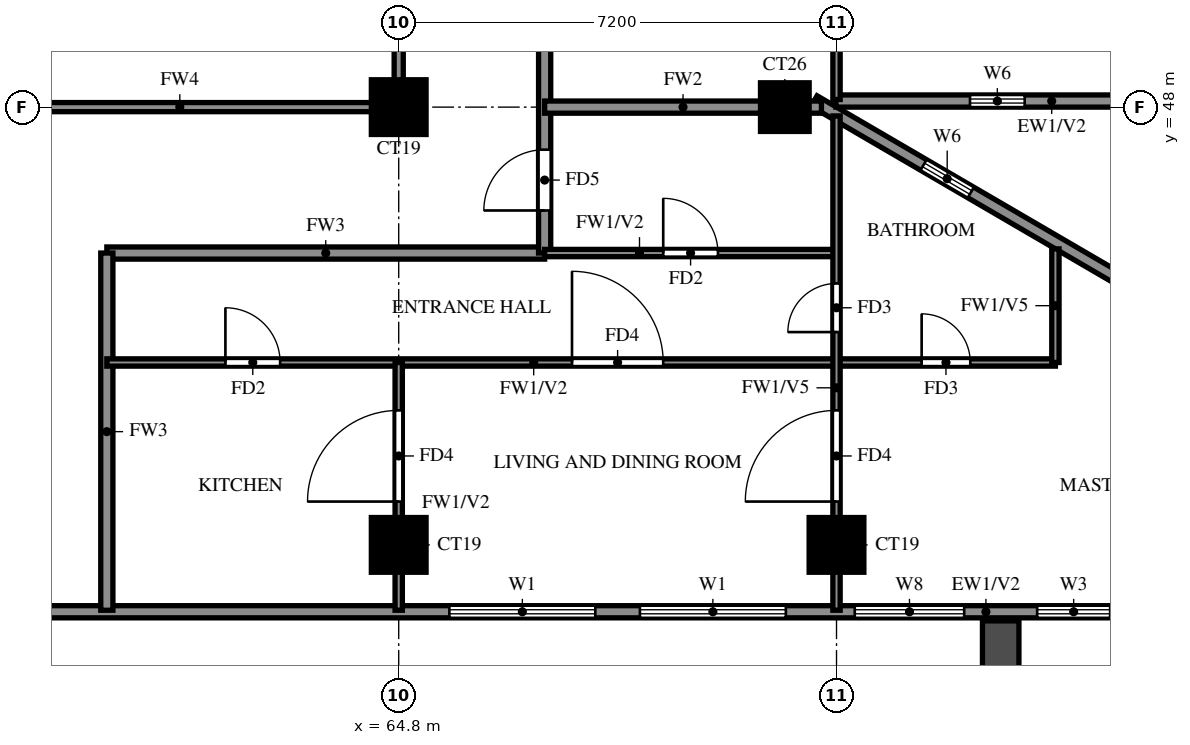
"""IFC4 building model, lengths in metres.
Left out: names, types, materials, properties, quantities, classifications, styles, units other than length and angle.
Written with IfcOpenShell. Run it as: python <this file> out.ifc"""

import sys

from ifc_helpers import new_model, si_unit, direction, frame, frame_2d, origin, origin_2d, place, context, subcontext, project, spatial, rectangle, extrude, source, transform, mapped, element, fill, save


model = new_model("IFC4")
c1 = context("Model", 3, precision=1e-05, world=origin(), true_north=direction((0.0, 1.0)))
c2 = subcontext(c1, "Body", "Model", "MODEL_VIEW")
j1 = project(units=[si_unit("LENGTHUNIT", "METRE"), si_unit("PLANEANGLEUNIT", "RADIAN")], contexts=[c1])
p1 = place(None, origin())
s1 = spatial("IfcSite", under=j1, at=p1, CompositionType="ELEMENT")
p2 = place(p1, origin())
s2 = spatial("IfcBuilding", under=s1, at=p2, CompositionType="ELEMENT")
p3 = place(p2, frame((0.0, 0.0, 195.5)))
s3 = spatial("IfcBuildingStorey", under=s2, at=p3, CompositionType="ELEMENT", Elevation=195.5)
m1 = source(origin(), c2, "Body", "SweptSolid", [
    extrude(rectangle(XDim=0.9, YDim=0.9, at=origin_2d()), origin(), (0.0, 0.0, 1.0), 3.2),
])
for number, where, z_axis, x_axis in (
    (1, (64.8, 40.8, 0.0), (0.0, 0.0, 1.0), (1.0, 0.0, 0.0)),
    (2, (72.0, 40.8, 0.0), (0.0, 0.0, 1.0), (1.0, 0.0, 0.0)),
    (3, (64.8, 48.0, 0.0), (0.0, 0.0, 1.0), (1.0, 0.0, 0.0)),
):
    element("IfcColumn", number, at=place(p3, frame(where, z_axis=z_axis, x_axis=x_axis)), inside=s3, PredefinedType="COLUMN", context=c2, shape_type="MappedRepresentation", body=[
        mapped(m1, transform((0.0, 0.0, 0.0))),
    ])
m2 = source(origin(), c2, "Body", "SweptSolid", [
    extrude(rectangle(XDim=0.8, YDim=0.8, at=origin_2d()), origin(), (0.0, 0.0, 1.0), 3.2),
])
p4 = place(p3, frame((71.15, 48.0, 0.0), z_axis=(0.0, 0.0, 1.0), x_axis=(1.0, 0.0, 0.0)))
e4 = element("IfcColumn", 4, at=p4, inside=s3, PredefinedType="COLUMN", context=c2, shape_type="MappedRepresentation", body=[
    mapped(m2, transform((0.0, 0.0, 0.0))),
])
p5 = place(p3, frame((85.719, 39.881, 0.0), z_axis=(0.0, 0.0, 1.0), x_axis=(-0.86377618652, 0.503875678716, 0.0)))
e5 = element("IfcWall", 5, at=p5, inside=s3, PredefinedType="SOLIDWALL", context=c2, shape_type="SweptSolid", body=[
    extrude(rectangle(XDim=16.311, YDim=0.2, at=frame_2d((8.156, 0.0))), origin(), (0.0, 0.0, 1.0), 3.2),
])
p6 = place(p5, frame((13.326, 0.0, 1.5)))
e6 = element("IfcOpeningElement", 6, at=p6, cuts=e5, PredefinedType="OPENING", context=c2, shape_type="SweptSolid", body=[
    extrude(rectangle(XDim=0.9, YDim=0.9, at=frame_2d((0.45, 0.45))), frame((0.0, 0.11, 0.0), z_axis=(0.0, -1.0, 0.0), x_axis=(1.0, 0.0, 0.0)), (0.0, 0.0, 1.0), 0.22),
])
p7 = place(p3, frame((71.99, 48.1, 0.0), z_axis=(0.0, 0.0, 1.0), x_axis=(1.0, 0.0, 0.0)))
e7 = element("IfcWall", 7, at=p7, inside=s3, PredefinedType="SOLIDWALL", context=c2, shape_type="SweptSolid", body=[
    extrude(rectangle(XDim=6.76, YDim=0.2, at=frame_2d((3.38, 0.0))), origin(), (0.0, 0.0, 1.0), 3.2),
])
p8 = place(p7, frame((2.205, 0.0, 1.5)))
e8 = element("IfcOpeningElement", 8, at=p8, cuts=e7, PredefinedType="OPENING", context=c2, shape_type="SweptSolid", body=[
    extrude(rectangle(XDim=0.9, YDim=0.9, at=frame_2d((0.45, 0.45))), frame((0.0, 0.11, 0.0), z_axis=(0.0, -1.0, 0.0), x_axis=(1.0, 0.0, 0.0)), (0.0, 0.0, 1.0), 0.22),
])
p9 = place(p3, frame((58.8, 39.7, 0.0), z_axis=(0.0, 0.0, 1.0), x_axis=(1.0, 0.0, 0.0)))
e9 = element("IfcWall", 9, at=p9, inside=s3, PredefinedType="SOLIDWALL", context=c2, shape_type="SweptSolid", body=[
    extrude(rectangle(XDim=27.23, YDim=0.2, at=frame_2d((13.615, 0.0))), origin(), (0.0, 0.0, 1.0), 3.2),
])
p10 = place(p9, frame((18.3, 0.0, 0.0)))
e10 = element("IfcOpeningElement", 10, at=p10, cuts=e9, PredefinedType="OPENING", context=c2, shape_type="SweptSolid", body=[
    extrude(rectangle(XDim=1.8, YDim=2.4, at=frame_2d((0.9, 1.2))), frame((0.0, 0.11, 0.0), z_axis=(0.0, -1.0, 0.0), x_axis=(1.0, 0.0, 0.0)), (0.0, 0.0, 1.0), 0.22),
])
p11 = place(p9, frame((6.833, 0.0, 0.6)))
e11 = element("IfcOpeningElement", 11, at=p11, cuts=e9, PredefinedType="OPENING", context=c2, shape_type="SweptSolid", body=[
    extrude(rectangle(XDim=2.4, YDim=2.4, at=frame_2d((1.2, 1.2))), frame((0.0, 0.11, 0.0), z_axis=(0.0, -1.0, 0.0), x_axis=(1.0, 0.0, 0.0)), (0.0, 0.0, 1.0), 0.22),
])
p12 = place(p9, frame((9.967, 0.0, 0.6)))
e12 = element("IfcOpeningElement", 12, at=p12, cuts=e9, PredefinedType="OPENING", context=c2, shape_type="SweptSolid", body=[
    extrude(rectangle(XDim=2.4, YDim=2.4, at=frame_2d((1.2, 1.2))), frame((0.0, 0.11, 0.0), z_axis=(0.0, -1.0, 0.0), x_axis=(1.0, 0.0, 0.0)), (0.0, 0.0, 1.0), 0.22),
])
p13 = place(p9, frame((13.5, 0.0, 0.6)))
e13 = element("IfcOpeningElement", 13, at=p13, cuts=e9, PredefinedType="OPENING", context=c2, shape_type="SweptSolid", body=[
    extrude(rectangle(XDim=1.8, YDim=2.4, at=frame_2d((0.9, 1.2))), frame((0.0, 0.11, 0.0), z_axis=(0.0, -1.0, 0.0), x_axis=(1.0, 0.0, 0.0)), (0.0, 0.0, 1.0), 0.22),
])
p14 = place(p9, frame((16.5, 0.0, 0.6)))
e14 = element("IfcOpeningElement", 14, at=p14, cuts=e9, PredefinedType="OPENING", context=c2, shape_type="SweptSolid", body=[
    extrude(rectangle(XDim=1.2, YDim=2.4, at=frame_2d((0.6, 1.2))), frame((0.0, 0.11, 0.0), z_axis=(0.0, -1.0, 0.0), x_axis=(1.0, 0.0, 0.0)), (0.0, 0.0, 1.0), 0.22),
])
p15 = place(p9, frame((20.7, 0.0, 0.6)))
e15 = element("IfcOpeningElement", 15, at=p15, cuts=e9, PredefinedType="OPENING", context=c2, shape_type="SweptSolid", body=[
    extrude(rectangle(XDim=1.2, YDim=2.4, at=frame_2d((0.6, 1.2))), frame((0.0, 0.11, 0.0), z_axis=(0.0, -1.0, 0.0), x_axis=(1.0, 0.0, 0.0)), (0.0, 0.0, 1.0), 0.22),
])
p16 = place(p9, frame((23.063, 0.0, 0.6)))
e16 = element("IfcOpeningElement", 16, at=p16, cuts=e9, PredefinedType="OPENING", context=c2, shape_type="SweptSolid", body=[
    extrude(rectangle(XDim=1.8, YDim=2.4, at=frame_2d((0.9, 1.2))), frame((0.0, 0.11, 0.0), z_axis=(0.0, -1.0, 0.0), x_axis=(1.0, 0.0, 0.0)), (0.0, 0.0, 1.0), 0.22),
])
p17 = place(p9, frame((25.978, 0.0, 0.6)))
e17 = element("IfcOpeningElement", 17, at=p17, cuts=e9, PredefinedType="OPENING", context=c2, shape_type="SweptSolid", body=[
    extrude(rectangle(XDim=0.9, YDim=2.4, at=frame_2d((0.45, 1.2))), frame((0.0, 0.11, 0.0), z_axis=(0.0, -1.0, 0.0), x_axis=(1.0, 0.0, 0.0)), (0.0, 0.0, 1.0), 0.22),
])
p18 = place(p3, frame((74.7, 39.55, 0.0), z_axis=(0.0, 0.0, 1.0), x_axis=(0.0, -1.0, 0.0)))
e18 = element("IfcWall", 18, at=p18, inside=s3, PredefinedType="SOLIDWALL", context=c2, shape_type="SweptSolid", body=[
    extrude(rectangle(XDim=2.65, YDim=0.6, at=frame_2d((1.325, 0.0))), origin(), (0.0, 0.0, 1.0), 2.85),
])
p19 = place(p3, frame((60.0, 45.6, 0.0), z_axis=(0.0, 0.0, 1.0), x_axis=(1.0, 0.0, 0.0)))
e19 = element("IfcWall", 19, at=p19, inside=s3, PredefinedType="SOLIDWALL", context=c2, shape_type="SweptSolid", body=[
    extrude(rectangle(XDim=7.2, YDim=0.2, at=frame_2d((3.6, 0.0))), origin(), (0.0, 0.0, 1.0), 3.2),
])
p20 = place(p3, frame((60.0, 39.725, 0.0), z_axis=(0.0, 0.0, 1.0), x_axis=(0.0, 1.0, 0.0)))
e20 = element("IfcWall", 20, at=p20, inside=s3, PredefinedType="SOLIDWALL", context=c2, shape_type="SweptSolid", body=[
    extrude(rectangle(XDim=5.875, YDim=0.2, at=frame_2d((2.938, 0.0))), origin(), (0.0, 0.0, 1.0), 3.2),
])
p21 = place(p3, frame((67.2, 45.6, 0.0), z_axis=(0.0, 0.0, 1.0), x_axis=(0.0, 1.0, 0.0)))
e21 = element("IfcWall", 21, at=p21, inside=s3, PredefinedType="SOLIDWALL", context=c2, shape_type="SweptSolid", body=[
    extrude(rectangle(XDim=10.8, YDim=0.2, at=frame_2d((5.4, 0.0))), origin(), (0.0, 0.0, 1.0), 3.2),
])
p22 = place(p21, frame((9.1, 0.0, 0.0)))
e22 = element("IfcOpeningElement", 22, at=p22, cuts=e21, PredefinedType="OPENING", context=c2, shape_type="SweptSolid", body=[
    extrude(rectangle(XDim=1.0, YDim=2.1, at=frame_2d((0.5, 1.05))), frame((0.0, 0.11, 0.0), z_axis=(0.0, -1.0, 0.0), x_axis=(1.0, 0.0, 0.0)), (0.0, 0.0, 1.0), 0.22),
])
p23 = place(p21, frame((0.7, 0.0, 0.0)))
e23 = element("IfcOpeningElement", 23, at=p23, cuts=e21, PredefinedType="OPENING", context=c2, shape_type="SweptSolid", body=[
    extrude(rectangle(XDim=1.0, YDim=2.1, at=frame_2d((0.5, 1.05))), frame((0.0, 0.11, 0.0), z_axis=(0.0, -1.0, 0.0), x_axis=(1.0, 0.0, 0.0)), (0.0, 0.0, 1.0), 0.22),
])
p24 = place(p3, frame((67.2, 48.0, 0.0), z_axis=(0.0, 0.0, 1.0), x_axis=(1.0, 0.0, 0.0)))
e24 = element("IfcWall", 24, at=p24, inside=s3, PredefinedType="SOLIDWALL", context=c2, shape_type="SweptSolid", body=[
    extrude(rectangle(XDim=4.552, YDim=0.2, at=frame_2d((2.276, 0.0))), origin(), (0.0, 0.0, 1.0), 3.2),
])
p25 = place(p3, frame((60.0, 43.8, 0.0), z_axis=(0.0, 0.0, 1.0), x_axis=(1.0, 0.0, 0.0)))
e25 = element("IfcWall", 25, at=p25, inside=s3, PredefinedType="PARTITIONING", context=c2, shape_type="SweptSolid", body=[
    extrude(rectangle(XDim=15.6, YDim=0.12, at=frame_2d((7.8, 0.0))), origin(), (0.0, 0.0, 1.0), 3.2),
])
p26 = place(p25, frame((7.65, 0.0, 0.0)))
e26 = element("IfcOpeningElement", 26, at=p26, cuts=e25, PredefinedType="OPENING", context=c2, shape_type="SweptSolid", body=[
    extrude(rectangle(XDim=1.5, YDim=2.1, at=frame_2d((0.75, 1.05))), frame((0.0, 0.07, 0.0), z_axis=(0.0, -1.0, 0.0), x_axis=(1.0, 0.0, 0.0)), (0.0, 0.0, 1.0), 0.14),
])
p27 = place(p25, frame((1.95, 0.0, 0.0)))
e27 = element("IfcOpeningElement", 27, at=p27, cuts=e25, PredefinedType="OPENING", context=c2, shape_type="SweptSolid", body=[
    extrude(rectangle(XDim=0.9, YDim=2.1, at=frame_2d((0.45, 1.05))), frame((0.0, 0.07, 0.0), z_axis=(0.0, -1.0, 0.0), x_axis=(1.0, 0.0, 0.0)), (0.0, 0.0, 1.0), 0.14),
])
p28 = place(p25, frame((13.4, 0.0, 0.0)))
e28 = element("IfcOpeningElement", 28, at=p28, cuts=e25, PredefinedType="OPENING", context=c2, shape_type="SweptSolid", body=[
    extrude(rectangle(XDim=0.8, YDim=2.1, at=frame_2d((0.4, 1.05))), frame((0.0, 0.07, 0.0), z_axis=(0.0, -1.0, 0.0), x_axis=(1.0, 0.0, 0.0)), (0.0, 0.0, 1.0), 0.14),
])
p29 = place(p3, frame((67.2, 45.6, 0.0), z_axis=(0.0, 0.0, 1.0), x_axis=(1.0, 0.0, 0.0)))
e29 = element("IfcWall", 29, at=p29, inside=s3, PredefinedType="PARTITIONING", context=c2, shape_type="SweptSolid", body=[
    extrude(rectangle(XDim=4.8, YDim=0.12, at=frame_2d((2.4, 0.0))), origin(), (0.0, 0.0, 1.0), 3.2),
])
p30 = place(p29, frame((1.95, 0.0, 0.0)))
e30 = element("IfcOpeningElement", 30, at=p30, cuts=e29, PredefinedType="OPENING", context=c2, shape_type="SweptSolid", body=[
    extrude(rectangle(XDim=0.9, YDim=2.1, at=frame_2d((0.45, 1.05))), frame((0.0, 0.07, 0.0), z_axis=(0.0, -1.0, 0.0), x_axis=(1.0, 0.0, 0.0)), (0.0, 0.0, 1.0), 0.14),
])
p31 = place(p3, frame((64.8, 39.725, 0.0), z_axis=(0.0, 0.0, 1.0), x_axis=(0.0, 1.0, 0.0)))
e31 = element("IfcWall", 31, at=p31, inside=s3, PredefinedType="PARTITIONING", context=c2, shape_type="SweptSolid", body=[
    extrude(rectangle(XDim=4.075, YDim=0.12, at=frame_2d((2.038, 0.0))), origin(), (0.0, 0.0, 1.0), 3.2),
])
p32 = place(p31, frame((1.788, 0.0, 0.0)))
e32 = element("IfcOpeningElement", 32, at=p32, cuts=e31, PredefinedType="OPENING", context=c2, shape_type="SweptSolid", body=[
    extrude(rectangle(XDim=1.5, YDim=2.1, at=frame_2d((0.75, 1.05))), frame((0.0, 0.07, 0.0), z_axis=(0.0, -1.0, 0.0), x_axis=(1.0, 0.0, 0.0)), (0.0, 0.0, 1.0), 0.14),
])
p33 = place(p3, frame((72.0, 39.725, 0.0), z_axis=(0.0, 0.0, 1.0), x_axis=(0.0, 1.0, 0.0)))
e33 = element("IfcWall", 33, at=p33, inside=s3, PredefinedType="PARTITIONING", context=c2, shape_type="SweptSolid", body=[
    extrude(rectangle(XDim=8.13, YDim=0.12, at=frame_2d((4.065, 0.0))), origin(), (0.0, 0.0, 1.0), 2.3),
])
p34 = place(p33, frame((1.788, 0.0, 0.0)))
e34 = element("IfcOpeningElement", 34, at=p34, cuts=e33, PredefinedType="OPENING", context=c2, shape_type="SweptSolid", body=[
    extrude(rectangle(XDim=1.5, YDim=2.1, at=frame_2d((0.75, 1.05))), frame((0.0, 0.07, 0.0), z_axis=(0.0, -1.0, 0.0), x_axis=(1.0, 0.0, 0.0)), (0.0, 0.0, 1.0), 0.14),
])
p35 = place(p33, frame((4.575, 0.0, 0.0)))
e35 = element("IfcOpeningElement", 35, at=p35, cuts=e33, PredefinedType="OPENING", context=c2, shape_type="SweptSolid", body=[
    extrude(rectangle(XDim=0.8, YDim=2.1, at=frame_2d((0.4, 1.05))), frame((0.0, 0.07, 0.0), z_axis=(0.0, -1.0, 0.0), x_axis=(1.0, 0.0, 0.0)), (0.0, 0.0, 1.0), 0.14),
])
p36 = place(p3, frame((72.0, 48.125, 0.0), z_axis=(0.0, 0.0, 1.0), x_axis=(0.0, 1.0, 0.0)))
e36 = element("IfcWall", 36, at=p36, inside=s3, PredefinedType="PARTITIONING", context=c2, shape_type="SweptSolid", body=[
    extrude(rectangle(XDim=5.875, YDim=0.12, at=frame_2d((2.938, 0.0))), origin(), (0.0, 0.0, 1.0), 3.2),
])
p37 = place(p3, frame((75.6, 43.8, 0.0), z_axis=(0.0, 0.0, 1.0), x_axis=(0.0, 1.0, 0.0)))
e37 = element("IfcWall", 37, at=p37, inside=s3, PredefinedType="PARTITIONING", context=c2, shape_type="SweptSolid", body=[
    extrude(rectangle(XDim=1.868, YDim=0.12, at=frame_2d((0.934, 0.0))), origin(), (0.0, 0.0, 1.0), 2.3),
])
p38 = place(p3, frame((57.6, 48.0, 0.0), z_axis=(0.0, 0.0, 1.0), x_axis=(1.0, 0.0, 0.0)))
e38 = element("IfcWall", 38, at=p38, inside=s3, PredefinedType="SOLIDWALL", context=c2, shape_type="SweptSolid", body=[
    extrude(rectangle(XDim=7.2, YDim=0.15, at=frame_2d((3.6, 0.0))), origin(), (0.0, 0.0, 1.0), 2.3),
])
p39 = place(p3, frame((64.8, 48.0, 0.0), z_axis=(0.0, 0.0, 1.0), x_axis=(0.0, 1.0, 0.0)))
e39 = element("IfcWall", 39, at=p39, inside=s3, PredefinedType="SOLIDWALL", context=c2, shape_type="SweptSolid", body=[
    extrude(rectangle(XDim=14.4, YDim=0.15, at=frame_2d((7.2, 0.0))), origin(), (0.0, 0.0, 1.0), 2.3),
])
p40 = place(p6, origin())
e40 = element("IfcWindow", 40, at=p40, inside=s3, PartitioningType="SINGLE_PANEL", PredefinedType="WINDOW", context=c2, shape_type="SweptSolid", body=[
    extrude(rectangle(XDim=0.9, YDim=0.9, at=frame_2d((0.45, 0.45))), frame((0.0, 0.03, 0.0), z_axis=(0.0, -1.0, 0.0), x_axis=(1.0, 0.0, 0.0)), (0.0, 0.0, 1.0), 0.06),
])
fill(e6, e40)
p41 = place(p8, origin())
e41 = element("IfcWindow", 41, at=p41, inside=s3, PartitioningType="SINGLE_PANEL", PredefinedType="WINDOW", context=c2, shape_type="SweptSolid", body=[
    extrude(rectangle(XDim=0.9, YDim=0.9, at=frame_2d((0.45, 0.45))), frame((0.0, 0.03, 0.0), z_axis=(0.0, -1.0, 0.0), x_axis=(1.0, 0.0, 0.0)), (0.0, 0.0, 1.0), 0.06),
])
fill(e8, e41)
p42 = place(p11, origin())
e42 = element("IfcWindow", 42, at=p42, inside=s3, PartitioningType="DOUBLE_PANEL_VERTICAL", PredefinedType="WINDOW", context=c2, shape_type="SweptSolid", body=[
    extrude(rectangle(XDim=2.4, YDim=2.4, at=frame_2d((1.2, 1.2))), frame((0.0, 0.03, 0.0), z_axis=(0.0, -1.0, 0.0), x_axis=(1.0, 0.0, 0.0)), (0.0, 0.0, 1.0), 0.06),
])
fill(e11, e42)
p43 = place(p12, origin())
e43 = element("IfcWindow", 43, at=p43, inside=s3, PartitioningType="DOUBLE_PANEL_VERTICAL", PredefinedType="WINDOW", context=c2, shape_type="SweptSolid", body=[
    extrude(rectangle(XDim=2.4, YDim=2.4, at=frame_2d((1.2, 1.2))), frame((0.0, 0.03, 0.0), z_axis=(0.0, -1.0, 0.0), x_axis=(1.0, 0.0, 0.0)), (0.0, 0.0, 1.0), 0.06),
])
fill(e12, e43)
p44 = place(p13, origin())
e44 = element("IfcWindow", 44, at=p44, inside=s3, PartitioningType="DOUBLE_PANEL_VERTICAL", PredefinedType="WINDOW", context=c2, shape_type="SweptSolid", body=[
    extrude(rectangle(XDim=1.8, YDim=2.4, at=frame_2d((0.9, 1.2))), frame((0.0, 0.03, 0.0), z_axis=(0.0, -1.0, 0.0), x_axis=(1.0, 0.0, 0.0)), (0.0, 0.0, 1.0), 0.06),
])
fill(e13, e44)
p45 = place(p14, origin())
e45 = element("IfcWindow", 45, at=p45, inside=s3, PartitioningType="SINGLE_PANEL", PredefinedType="WINDOW", context=c2, shape_type="SweptSolid", body=[
    extrude(rectangle(XDim=1.2, YDim=2.4, at=frame_2d((0.6, 1.2))), frame((0.0, 0.03, 0.0), z_axis=(0.0, -1.0, 0.0), x_axis=(1.0, 0.0, 0.0)), (0.0, 0.0, 1.0), 0.06),
])
fill(e14, e45)
p46 = place(p32, origin())
e46 = element("IfcDoor", 46, at=p46, inside=s3, OperationType="SINGLE_SWING_RIGHT", PredefinedType="DOOR", context=c2, shape_type="SweptSolid", body=[
    extrude(rectangle(XDim=1.5, YDim=2.1, at=frame_2d((0.75, 1.05))), frame((0.0, 0.025, 0.0), z_axis=(0.0, -1.0, 0.0), x_axis=(1.0, 0.0, 0.0)), (0.0, 0.0, 1.0), 0.05),
])
fill(e32, e46)
p47 = place(p30, origin())
e47 = element("IfcDoor", 47, at=p47, inside=s3, OperationType="SINGLE_SWING_LEFT", PredefinedType="DOOR", context=c2, shape_type="SweptSolid", body=[
    extrude(rectangle(XDim=0.9, YDim=2.1, at=frame_2d((0.45, 1.05))), frame((0.0, 0.025, 0.0), z_axis=(0.0, -1.0, 0.0), x_axis=(1.0, 0.0, 0.0)), (0.0, 0.0, 1.0), 0.05),
])
fill(e30, e47)
p48 = place(p23, origin())
e48 = element("IfcDoor", 48, at=p48, inside=s3, OperationType="SINGLE_SWING_RIGHT", PredefinedType="DOOR", context=c2, shape_type="SweptSolid", body=[
    extrude(rectangle(XDim=1.0, YDim=2.1, at=frame_2d((0.5, 1.05))), frame((0.0, 0.025, 0.0), z_axis=(0.0, -1.0, 0.0), x_axis=(1.0, 0.0, 0.0)), (0.0, 0.0, 1.0), 0.05),
])
fill(e23, e48)
p49 = place(p26, origin())
e49 = element("IfcDoor", 49, at=p49, inside=s3, OperationType="SINGLE_SWING_LEFT", PredefinedType="DOOR", context=c2, shape_type="SweptSolid", body=[
    extrude(rectangle(XDim=1.5, YDim=2.1, at=frame_2d((0.75, 1.05))), frame((0.0, 0.025, 0.0), z_axis=(0.0, -1.0, 0.0), x_axis=(1.0, 0.0, 0.0)), (0.0, 0.0, 1.0), 0.05),
])
fill(e26, e49)
p50 = place(p27, origin())
e50 = element("IfcDoor", 50, at=p50, inside=s3, OperationType="SINGLE_SWING_LEFT", PredefinedType="DOOR", context=c2, shape_type="SweptSolid", body=[
    extrude(rectangle(XDim=0.9, YDim=2.1, at=frame_2d((0.45, 1.05))), frame((0.0, 0.025, 0.0), z_axis=(0.0, -1.0, 0.0), x_axis=(1.0, 0.0, 0.0)), (0.0, 0.0, 1.0), 0.05),
])
fill(e27, e50)
p51 = place(p34, origin())
e51 = element("IfcDoor", 51, at=p51, inside=s3, OperationType="SINGLE_SWING_LEFT", PredefinedType="DOOR", context=c2, shape_type="SweptSolid", body=[
    extrude(rectangle(XDim=1.5, YDim=2.1, at=frame_2d((0.75, 1.05))), frame((0.0, 0.025, 0.0), z_axis=(0.0, -1.0, 0.0), x_axis=(1.0, 0.0, 0.0)), (0.0, 0.0, 1.0), 0.05),
])
fill(e34, e51)
p52 = place(p35, origin())
e52 = element("IfcDoor", 52, at=p52, inside=s3, OperationType="SINGLE_SWING_LEFT", PredefinedType="DOOR", context=c2, shape_type="SweptSolid", body=[
    extrude(rectangle(XDim=0.8, YDim=2.1, at=frame_2d((0.4, 1.05))), frame((0.0, 0.025, 0.0), z_axis=(0.0, -1.0, 0.0), x_axis=(1.0, 0.0, 0.0)), (0.0, 0.0, 1.0), 0.05),
])
fill(e35, e52)
p53 = place(p28, origin())
e53 = element("IfcDoor", 53, at=p53, inside=s3, OperationType="SINGLE_SWING_LEFT", PredefinedType="DOOR", context=c2, shape_type="SweptSolid", body=[
    extrude(rectangle(XDim=0.8, YDim=2.1, at=frame_2d((0.4, 1.05))), frame((0.0, 0.025, 0.0), z_axis=(0.0, -1.0, 0.0), x_axis=(1.0, 0.0, 0.0)), (0.0, 0.0, 1.0), 0.05),
])
fill(e28, e53)
save(model, sys.argv[1])
